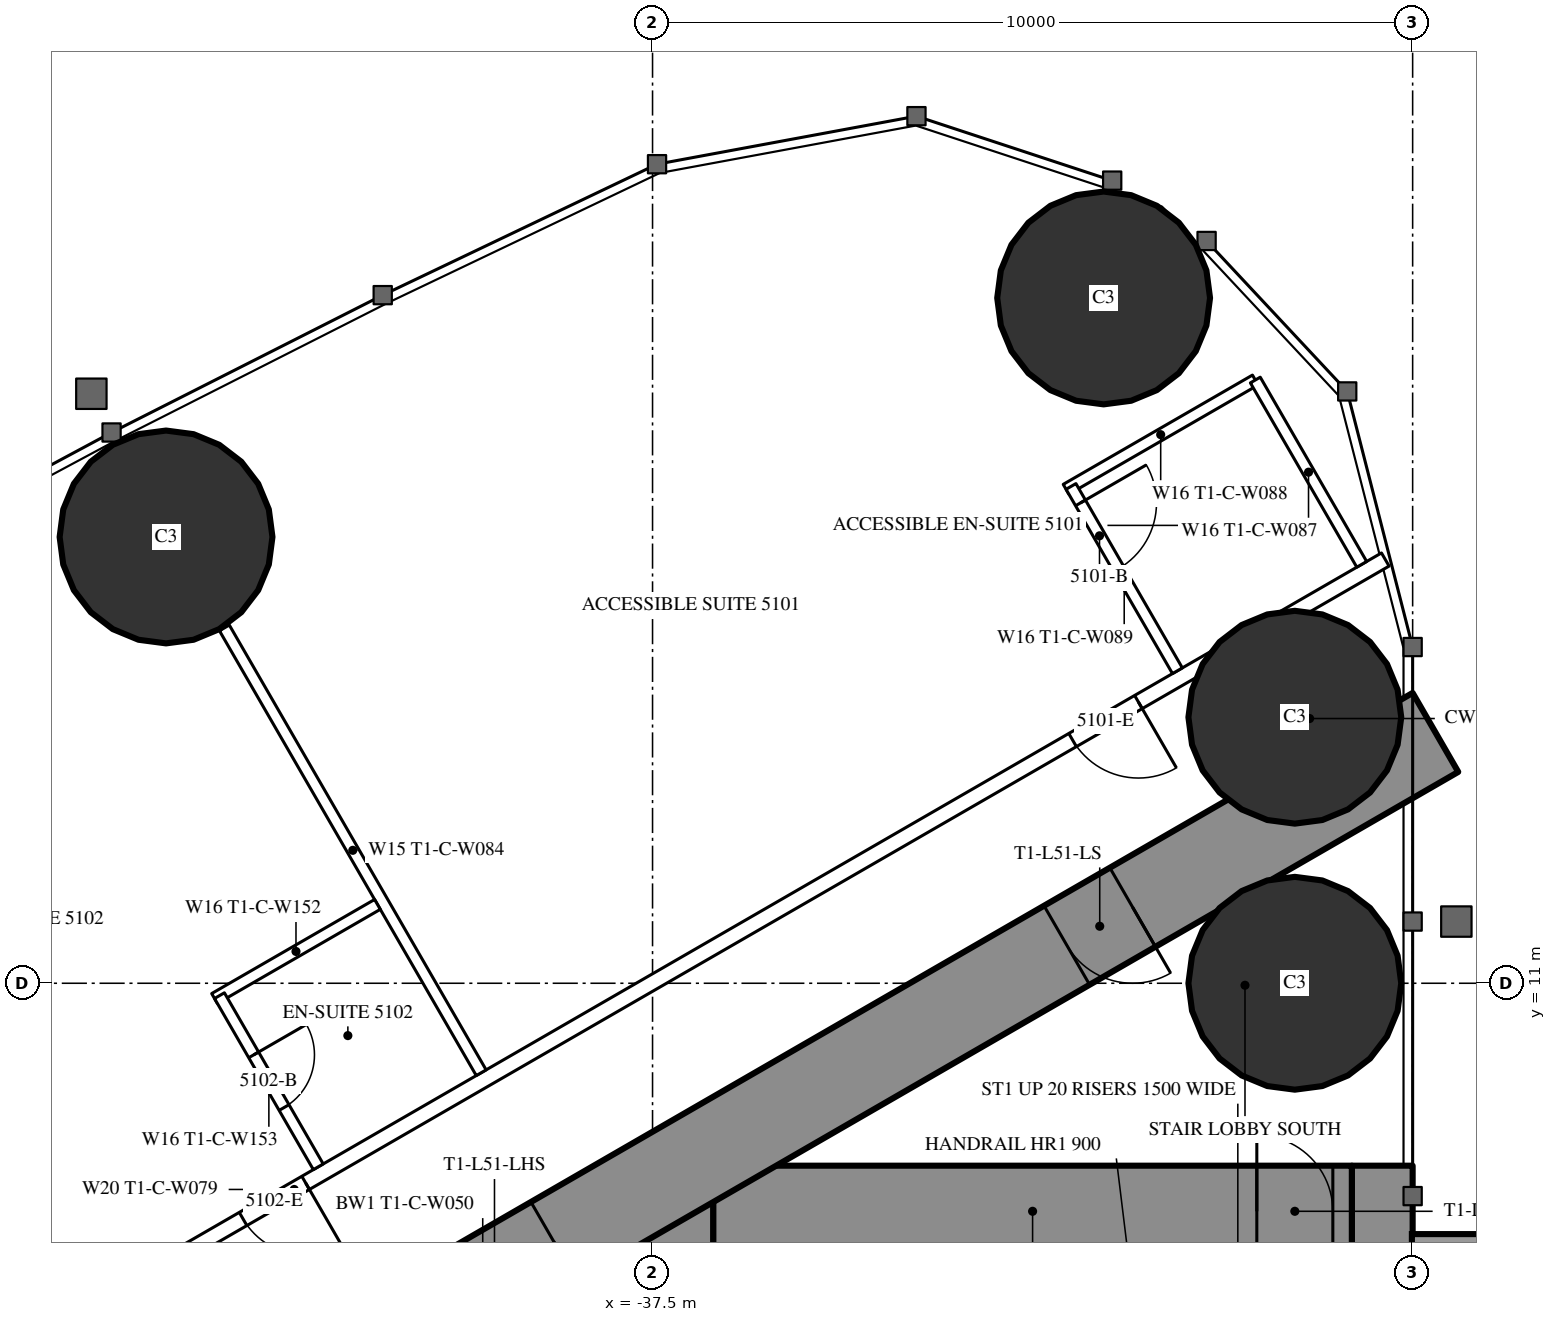
"""IFC4 building model, lengths in metres.
Left out: names, types, materials, properties, quantities, classifications, styles, units other than length and angle.
Written with IfcOpenShell. Run it as: python <this file> out.ifc"""

import sys

from ifc_helpers import new_model, si_unit, direction, frame, frame_2d, origin, origin_2d, place, context, subcontext, project, spatial, rectangle, circle, extrude, element, fill, save


model = new_model("IFC4")
c1 = context("Model", 3, precision=1e-05, world=origin(), true_north=direction((0.0, 1.0)))
c2 = subcontext(c1, "Body", "Model", "MODEL_VIEW")
j1 = project(units=[si_unit("LENGTHUNIT", "METRE"), si_unit("PLANEANGLEUNIT", "RADIAN")], contexts=[c1])
p1 = place(None, origin())
s1 = spatial("IfcSite", under=j1, at=p1, CompositionType="ELEMENT")
p2 = place(p1, origin())
s2 = spatial("IfcBuilding", under=s1, at=p2, CompositionType="ELEMENT")
p3 = place(p2, frame((0.0, 0.0, 191.3)))
s3 = spatial("IfcBuildingStorey", under=s2, at=p3, CompositionType="ELEMENT", Elevation=191.3)
for number, where, z_axis, x_axis in (
    (1, (-31.565, 20.016, 0.0), (0.0, 0.0, 1.0), (1.0, 0.0, 0.0)),
    (2, (-29.05, 11.0, 0.0), (0.0, 0.0, 1.0), (1.0, 0.0, 0.0)),
    (3, (-29.05, 14.5, 0.0), (0.0, 0.0, 1.0), (1.0, 0.0, 0.0)),
    (4, (-43.9, 16.871, 0.0), (0.0, 0.0, 1.0), (1.0, 0.0, 0.0)),
):
    element("IfcColumn", number, at=place(p3, frame(where, z_axis=z_axis, x_axis=x_axis)), inside=s3, PredefinedType="COLUMN", context=c2, shape_type="SweptSolid", body=[
        extrude(circle(Radius=1.4, at=origin_2d()), origin(), (0.0, 0.0, 1.0), 3.5),
    ])
p4 = place(p3, frame((-27.9, 8.6, 0.0), z_axis=(0.0, 0.0, 1.0), x_axis=(0.0, -1.0, 0.0)))
e5 = element("IfcWall", 5, at=p4, inside=s3, PredefinedType="SHEAR", context=c2, shape_type="SweptSolid", body=[
    extrude(rectangle(XDim=17.2, YDim=0.8, at=frame_2d((8.6, 0.0))), origin(), (0.0, 0.0, 1.0), 3.5),
])
p5 = place(p4, frame((2.45, 0.0, 0.6)))
e6 = element("IfcOpeningElement", 6, at=p5, cuts=e5, PredefinedType="OPENING", context=c2, shape_type="SweptSolid", body=[
    extrude(rectangle(XDim=0.6, YDim=2.1, at=frame_2d((0.3, 1.05))), frame((0.0, 0.41, 0.0), z_axis=(0.0, -1.0, 0.0), x_axis=(1.0, 0.0, 0.0)), (0.0, 0.0, 1.0), 0.82),
])
p6 = place(p4, frame((14.15, 0.0, 0.6)))
e7 = element("IfcOpeningElement", 7, at=p6, cuts=e5, PredefinedType="OPENING", context=c2, shape_type="SweptSolid", body=[
    extrude(rectangle(XDim=0.6, YDim=2.1, at=frame_2d((0.3, 1.05))), frame((0.0, 0.41, 0.0), z_axis=(0.0, -1.0, 0.0), x_axis=(1.0, 0.0, 0.0)), (0.0, 0.0, 1.0), 0.82),
])
p7 = place(p3, frame((-37.3, 8.6, 0.0), z_axis=(0.0, 0.0, 1.0), x_axis=(0.0, -1.0, 0.0)))
e8 = element("IfcWall", 8, at=p7, inside=s3, PredefinedType="SHEAR", context=c2, shape_type="SweptSolid", body=[
    extrude(rectangle(XDim=17.2, YDim=1.2, at=frame_2d((8.6, 0.0))), origin(), (0.0, 0.0, 1.0), 3.5),
])
p8 = place(p7, frame((7.7, 0.0, 0.0)))
e9 = element("IfcOpeningElement", 9, at=p8, cuts=e8, PredefinedType="OPENING", context=c2, shape_type="SweptSolid", body=[
    extrude(rectangle(XDim=1.8, YDim=2.2, at=frame_2d((0.9, 1.1))), frame((0.0, 0.61, 0.0), z_axis=(0.0, -1.0, 0.0), x_axis=(1.0, 0.0, 0.0)), (0.0, 0.0, 1.0), 1.22),
])
p9 = place(p3, frame((-28.3, 8.0, 0.0), z_axis=(0.0, 0.0, 1.0), x_axis=(-1.0, 0.0, 0.0)))
e10 = element("IfcWall", 10, at=p9, inside=s3, PredefinedType="SHEAR", context=c2, shape_type="SweptSolid", body=[
    extrude(rectangle(XDim=8.4, YDim=1.2, at=frame_2d((4.2, 0.0))), origin(), (0.0, 0.0, 1.0), 3.5),
])
p10 = place(p9, frame((0.25, 0.0, 0.0)))
e11 = element("IfcOpeningElement", 11, at=p10, cuts=e10, PredefinedType="OPENING", context=c2, shape_type="SweptSolid", body=[
    extrude(rectangle(XDim=1.0, YDim=2.2, at=frame_2d((0.5, 1.1))), frame((0.0, 0.61, 0.0), z_axis=(0.0, -1.0, 0.0), x_axis=(1.0, 0.0, 0.0)), (0.0, 0.0, 1.0), 1.22),
])
p11 = place(p3, frame((-27.2, 14.3, 0.0), z_axis=(0.0, 0.0, 1.0), x_axis=(-0.866026593062, -0.499997940104, 0.0)))
e12 = element("IfcWall", 12, at=p11, inside=s3, PredefinedType="SHEAR", context=c2, shape_type="SweptSolid", body=[
    extrude(rectangle(XDim=28.946, YDim=1.2, at=frame_2d((14.473, 0.0))), origin(), (0.0, 0.0, 1.0), 3.5),
])
p12 = place(p11, frame((4.6, 0.0, 0.0)))
e13 = element("IfcOpeningElement", 13, at=p12, cuts=e12, PredefinedType="OPENING", context=c2, shape_type="SweptSolid", body=[
    extrude(rectangle(XDim=1.0, YDim=2.2, at=frame_2d((0.5, 1.1))), frame((0.0, 0.61, 0.0), z_axis=(0.0, -1.0, 0.0), x_axis=(1.0, 0.0, 0.0)), (0.0, 0.0, 1.0), 1.22),
])
p13 = place(p11, frame((13.395, 0.0, 0.0)))
e14 = element("IfcOpeningElement", 14, at=p13, cuts=e12, PredefinedType="OPENING", context=c2, shape_type="SweptSolid", body=[
    extrude(rectangle(XDim=1.8, YDim=2.2, at=frame_2d((0.9, 1.1))), frame((0.0, 0.61, 0.0), z_axis=(0.0, -1.0, 0.0), x_axis=(1.0, 0.0, 0.0)), (0.0, 0.0, 1.0), 1.22),
])
p14 = place(p3, frame((-27.86, 16.575, 0.0), z_axis=(0.0, 0.0, 1.0), x_axis=(-0.866025533911, -0.499999774615, 0.0)))
e15 = element("IfcWall", 15, at=p14, inside=s3, PredefinedType="PARTITIONING", context=c2, shape_type="SweptSolid", body=[
    extrude(rectangle(XDim=33.149, YDim=0.2, at=frame_2d((16.575, 0.0))), origin(), (0.0, 0.0, 1.0), 3.25),
])
p15 = place(p14, frame((3.75, 0.0, 0.0)))
e16 = element("IfcOpeningElement", 16, at=p15, cuts=e15, PredefinedType="OPENING", context=c2, shape_type="SweptSolid", body=[
    extrude(rectangle(XDim=1.0, YDim=2.2, at=frame_2d((0.5, 1.1))), frame((0.0, 0.11, 0.0), z_axis=(0.0, -1.0, 0.0), x_axis=(1.0, 0.0, 0.0)), (0.0, 0.0, 1.0), 0.22),
])
p16 = place(p14, frame((16.402, 0.0, 0.0)))
e17 = element("IfcOpeningElement", 17, at=p16, cuts=e15, PredefinedType="OPENING", context=c2, shape_type="SweptSolid", body=[
    extrude(rectangle(XDim=0.95, YDim=2.2, at=frame_2d((0.475, 1.1))), frame((0.0, 0.11, 0.0), z_axis=(0.0, -1.0, 0.0), x_axis=(1.0, 0.0, 0.0)), (0.0, 0.0, 1.0), 0.22),
])
p17 = place(p14, frame((22.047, 0.0, 0.0)))
e18 = element("IfcOpeningElement", 18, at=p17, cuts=e15, PredefinedType="OPENING", context=c2, shape_type="SweptSolid", body=[
    extrude(rectangle(XDim=0.95, YDim=2.2, at=frame_2d((0.475, 1.1))), frame((0.0, 0.11, 0.0), z_axis=(0.0, -1.0, 0.0), x_axis=(1.0, 0.0, 0.0)), (0.0, 0.0, 1.0), 0.22),
])
p18 = place(p14, frame((30.396, 0.0, 0.0)))
e19 = element("IfcOpeningElement", 19, at=p18, cuts=e15, PredefinedType="OPENING", context=c2, shape_type="SweptSolid", body=[
    extrude(rectangle(XDim=1.8, YDim=2.2, at=frame_2d((0.9, 1.1))), frame((0.0, 0.11, 0.0), z_axis=(0.0, -1.0, 0.0), x_axis=(1.0, 0.0, 0.0)), (0.0, 0.0, 1.0), 0.22),
])
p19 = place(p3, frame((-39.754, 9.823, 0.0), z_axis=(0.0, 0.0, 1.0), x_axis=(-0.499997670926, 0.866026748472, 0.0)))
e20 = element("IfcWall", 20, at=p19, inside=s3, PredefinedType="PARTITIONING", context=c2, shape_type="SweptSolid", body=[
    extrude(rectangle(XDim=6.757, YDim=0.15, at=frame_2d((3.379, 0.0))), origin(), (0.0, 0.0, 1.0), 2.3),
])
p20 = place(p3, frame((-29.57, 18.936, 0.0), z_axis=(0.0, 0.0, 1.0), x_axis=(-0.866018712932, -0.500011588718, 0.0)))
e21 = element("IfcWall", 21, at=p20, inside=s3, PredefinedType="PARTITIONING", context=c2, shape_type="SweptSolid", body=[
    extrude(rectangle(XDim=2.875, YDim=0.15, at=frame_2d((1.438, 0.0))), origin(), (0.0, 0.0, 1.0), 3.25),
])
p21 = place(p3, frame((-30.595, 15.111, 0.0), z_axis=(0.0, 0.0, 1.0), x_axis=(-0.49998411664, 0.866034573852, 0.0)))
e22 = element("IfcWall", 22, at=p21, inside=s3, PredefinedType="PARTITIONING", context=c2, shape_type="SweptSolid", body=[
    extrude(rectangle(XDim=2.8, YDim=0.15, at=frame_2d((1.4, 0.0))), origin(), (0.0, 0.0, 1.0), 3.25),
])
p22 = place(p21, frame((1.55, 0.0, 0.0)))
e23 = element("IfcOpeningElement", 23, at=p22, cuts=e22, PredefinedType="OPENING", context=c2, shape_type="SweptSolid", body=[
    extrude(rectangle(XDim=1.0, YDim=2.2, at=frame_2d((0.5, 1.1))), frame((0.0, 0.085, 0.0), z_axis=(0.0, -1.0, 0.0), x_axis=(1.0, 0.0, 0.0)), (0.0, 0.0, 1.0), 0.17),
])
p23 = place(p3, frame((-28.17, 16.511, 0.0), z_axis=(0.0, 0.0, 1.0), x_axis=(-0.49994636267, 0.866056369097, 0.0)))
e24 = element("IfcWall", 24, at=p23, inside=s3, PredefinedType="PARTITIONING", context=c2, shape_type="SweptSolid", body=[
    extrude(rectangle(XDim=2.8, YDim=0.15, at=frame_2d((1.4, 0.0))), origin(), (0.0, 0.0, 1.0), 3.25),
])
p24 = place(p3, frame((-41.119, 12.037, 0.0), z_axis=(0.0, 0.0, 1.0), x_axis=(-0.866073894602, -0.499916002032, 0.0)))
e25 = element("IfcWall", 25, at=p24, inside=s3, PredefinedType="PARTITIONING", context=c2, shape_type="SweptSolid", body=[
    extrude(rectangle(XDim=2.475, YDim=0.15, at=frame_2d((1.238, 0.0))), origin(), (0.0, 0.0, 1.0), 3.25),
])
p25 = place(p3, frame((-41.898, 8.585, 0.0), z_axis=(0.0, 0.0, 1.0), x_axis=(-0.500006934395, 0.866021400173, 0.0)))
e26 = element("IfcWall", 26, at=p25, inside=s3, PredefinedType="PARTITIONING", context=c2, shape_type="SweptSolid", body=[
    extrude(rectangle(XDim=2.6, YDim=0.15, at=frame_2d((1.3, 0.0))), origin(), (0.0, 0.0, 1.0), 3.25),
])
p26 = place(p25, frame((0.9, 0.0, 0.0)))
e27 = element("IfcOpeningElement", 27, at=p26, cuts=e26, PredefinedType="OPENING", context=c2, shape_type="SweptSolid", body=[
    extrude(rectangle(XDim=0.8, YDim=2.2, at=frame_2d((0.4, 1.1))), frame((0.0, 0.085, 0.0), z_axis=(0.0, -1.0, 0.0), x_axis=(1.0, 0.0, 0.0)), (0.0, 0.0, 1.0), 0.17),
])
p27 = place(p22, origin())
e28 = element("IfcDoor", 28, at=p27, inside=s3, OperationType="SINGLE_SWING_RIGHT", PredefinedType="DOOR", context=c2, shape_type="SweptSolid", body=[
    extrude(rectangle(XDim=1.0, YDim=2.2, at=frame_2d((0.5, 1.1))), frame((0.0, 0.025, 0.0), z_axis=(0.0, -1.0, 0.0), x_axis=(1.0, 0.0, 0.0)), (0.0, 0.0, 1.0), 0.05),
])
fill(e23, e28)
p28 = place(p15, origin())
e29 = element("IfcDoor", 29, at=p28, inside=s3, OperationType="SINGLE_SWING_LEFT", PredefinedType="DOOR", context=c2, shape_type="SweptSolid", body=[
    extrude(rectangle(XDim=1.0, YDim=2.2, at=frame_2d((0.5, 1.1))), frame((0.0, 0.025, 0.0), z_axis=(0.0, -1.0, 0.0), x_axis=(1.0, 0.0, 0.0)), (0.0, 0.0, 1.0), 0.05),
])
fill(e16, e29)
p29 = place(p26, origin())
e30 = element("IfcDoor", 30, at=p29, inside=s3, OperationType="SINGLE_SWING_RIGHT", PredefinedType="DOOR", context=c2, shape_type="SweptSolid", body=[
    extrude(rectangle(XDim=0.8, YDim=2.2, at=frame_2d((0.4, 1.1))), frame((0.0, 0.025, 0.0), z_axis=(0.0, -1.0, 0.0), x_axis=(1.0, 0.0, 0.0)), (0.0, 0.0, 1.0), 0.05),
])
fill(e27, e30)
p30 = place(p16, origin())
e31 = element("IfcDoor", 31, at=p30, inside=s3, OperationType="SINGLE_SWING_LEFT", PredefinedType="DOOR", context=c2, shape_type="SweptSolid", body=[
    extrude(rectangle(XDim=0.95, YDim=2.2, at=frame_2d((0.475, 1.1))), frame((0.0, 0.025, 0.0), z_axis=(0.0, -1.0, 0.0), x_axis=(1.0, 0.0, 0.0)), (0.0, 0.0, 1.0), 0.05),
])
fill(e17, e31)
p31 = place(p12, origin())
e32 = element("IfcDoor", 32, at=p31, inside=s3, OperationType="SINGLE_SWING_LEFT", PredefinedType="DOOR", context=c2, shape_type="SweptSolid", body=[
    extrude(rectangle(XDim=1.0, YDim=2.2, at=frame_2d((0.5, 1.1))), frame((0.0, 0.025, 0.0), z_axis=(0.0, -1.0, 0.0), x_axis=(1.0, 0.0, 0.0)), (0.0, 0.0, 1.0), 0.05),
])
fill(e13, e32)
p32 = place(p13, origin())
e33 = element("IfcDoor", 33, at=p32, inside=s3, OperationType="DOUBLE_DOOR_SINGLE_SWING", PredefinedType="DOOR", context=c2, shape_type="SweptSolid", body=[
    extrude(rectangle(XDim=1.8, YDim=2.2, at=frame_2d((0.9, 1.1))), frame((0.0, 0.025, 0.0), z_axis=(0.0, -1.0, 0.0), x_axis=(1.0, 0.0, 0.0)), (0.0, 0.0, 1.0), 0.05),
])
fill(e14, e33)
p33 = place(p10, origin())
e34 = element("IfcDoor", 34, at=p33, inside=s3, OperationType="SINGLE_SWING_RIGHT", PredefinedType="DOOR", context=c2, shape_type="SweptSolid", body=[
    extrude(rectangle(XDim=1.0, YDim=2.2, at=frame_2d((0.5, 1.1))), frame((0.0, 0.025, 0.0), z_axis=(0.0, -1.0, 0.0), x_axis=(1.0, 0.0, 0.0)), (0.0, 0.0, 1.0), 0.05),
])
fill(e11, e34)
save(model, sys.argv[1])
